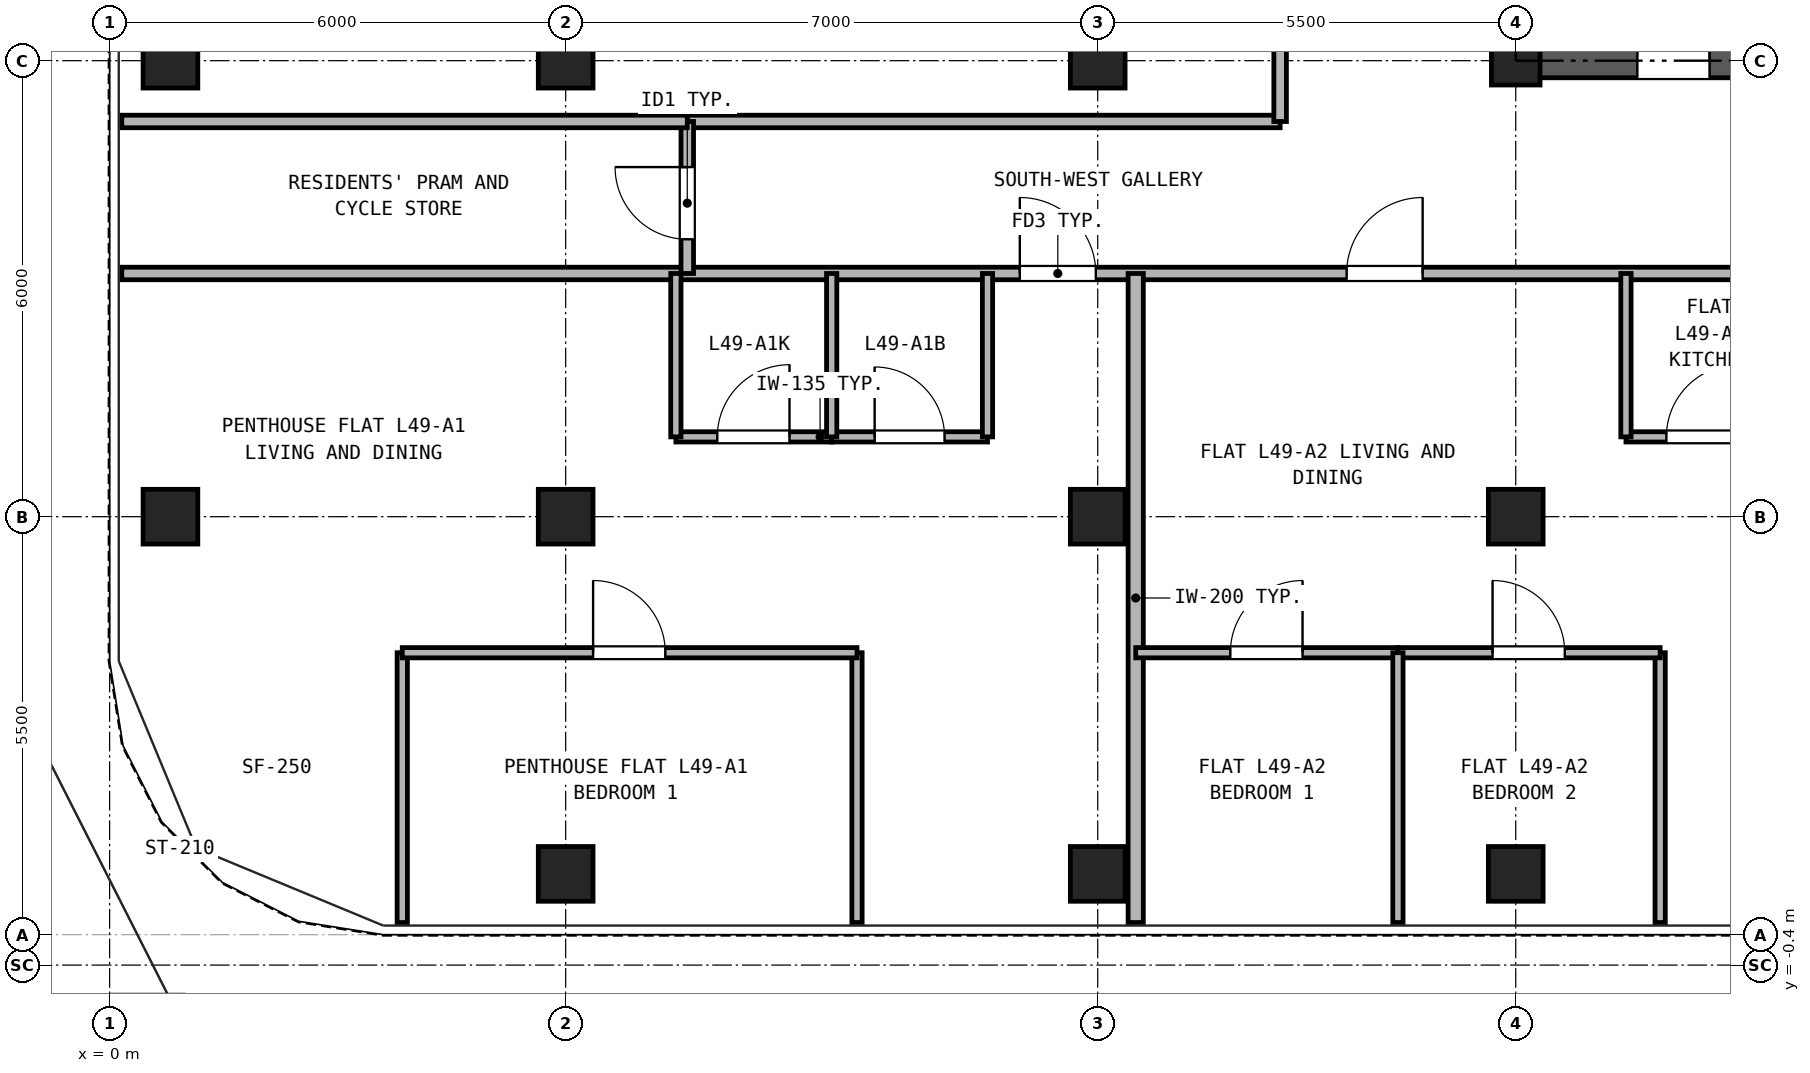
"""IFC4 building model, lengths in metres.
Left out: names, types, materials, properties, quantities, classifications, styles, units other than length and angle.
Written with IfcOpenShell. Run it as: python <this file> out.ifc"""

import sys

from ifc_helpers import new_model, si_unit, direction, frame, frame_2d, origin, origin_2d, place, context, subcontext, project, spatial, rectangle, hollow_rectangle, extrude, source, transform, mapped, element, fill, save


model = new_model("IFC4")
c1 = context("Model", 3, precision=1e-05, world=origin(), true_north=direction((0.0, 1.0)))
c2 = subcontext(c1, "Body", "Model", "MODEL_VIEW")
j1 = project(units=[si_unit("LENGTHUNIT", "METRE"), si_unit("PLANEANGLEUNIT", "RADIAN")], contexts=[c1])
p1 = place(None, origin())
s1 = spatial("IfcSite", under=j1, at=p1, CompositionType="ELEMENT")
p2 = place(p1, origin())
s2 = spatial("IfcBuilding", under=s1, at=p2, CompositionType="ELEMENT")
p3 = place(p2, frame((0.0, 0.0, 175.3)))
s3 = spatial("IfcBuildingStorey", under=s2, at=p3, CompositionType="ELEMENT", Elevation=175.3)
m1 = source(origin(), c2, "Body", "SweptSolid", [
    extrude(hollow_rectangle(XDim=0.72, YDim=0.72, WallThickness=0.04, at=origin_2d()), origin(), (0.0, 0.0, 1.0), 2.95),
])
for number, where, z_axis, x_axis in (
    (1, (6.0, 0.8, 0.0), (0.0, 0.0, 1.0), (1.0, 0.0, 0.0)),
    (2, (13.0, 0.8, 0.0), (0.0, 0.0, 1.0), (1.0, 0.0, 0.0)),
    (3, (18.5, 0.8, 0.0), (0.0, 0.0, 1.0), (1.0, 0.0, 0.0)),
    (4, (0.8, 5.5, 0.0), (0.0, 0.0, 1.0), (1.0, 0.0, 0.0)),
    (5, (0.8, 11.5, 0.0), (0.0, 0.0, 1.0), (1.0, 0.0, 0.0)),
    (6, (6.0, 5.5, 0.0), (0.0, 0.0, 1.0), (1.0, 0.0, 0.0)),
    (7, (6.0, 11.5, 0.0), (0.0, 0.0, 1.0), (1.0, 0.0, 0.0)),
    (8, (13.0, 5.5, 0.0), (0.0, 0.0, 1.0), (1.0, 0.0, 0.0)),
    (9, (13.0, 11.5, 0.0), (0.0, 0.0, 1.0), (1.0, 0.0, 0.0)),
    (10, (18.5, 5.5, 0.0), (0.0, 0.0, 1.0), (1.0, 0.0, 0.0)),
):
    element("IfcColumn", number, at=place(p3, frame(where, z_axis=z_axis, x_axis=x_axis)), inside=s3, PredefinedType="COLUMN", context=c2, shape_type="MappedRepresentation", body=[
        mapped(m1, transform((0.0, 0.0, 0.0), x_axis=(1.0, 0.0, 0.0), y_axis=(0.0, 1.0, 0.0), z_axis=(0.0, 0.0, 1.0), scale=1.0)),
    ])
m2 = source(origin(), c2, "Body", "SweptSolid", [
    extrude(hollow_rectangle(XDim=0.64, YDim=0.64, WallThickness=0.035, at=origin_2d()), origin(), (0.0, 0.0, 1.0), 2.95),
])
p4 = place(p3, frame((18.5, 11.5, 0.0), z_axis=(0.0, 0.0, 1.0), x_axis=(1.0, 0.0, 0.0)))
e11 = element("IfcColumn", 11, at=p4, inside=s3, PredefinedType="COLUMN", context=c2, shape_type="MappedRepresentation", body=[
    mapped(m2, transform((0.0, 0.0, 0.0), x_axis=(1.0, 0.0, 0.0), y_axis=(0.0, 1.0, 0.0), z_axis=(0.0, 0.0, 1.0), scale=1.0)),
])
p5 = place(p3, frame((18.275, 11.5, 0.0), z_axis=(0.0, 0.0, 1.0), x_axis=(1.0, 0.0, 0.0)))
e12 = element("IfcWall", 12, at=p5, inside=s3, PredefinedType="SHEAR", context=c2, shape_type="SweptSolid", body=[
    extrude(rectangle(XDim=10.45, YDim=0.45, at=frame_2d((5.225, 0.0))), origin(), (0.0, 0.0, 1.0), 2.95),
])
p6 = place(p5, frame((1.825, 0.0, 0.0)))
e13 = element("IfcOpeningElement", 13, at=p6, cuts=e12, PredefinedType="OPENING", context=c2, shape_type="SweptSolid", body=[
    extrude(rectangle(XDim=0.95, YDim=2.15, at=frame_2d((0.475, 1.075))), frame((0.0, 0.235, 0.0), z_axis=(0.0, -1.0, 0.0), x_axis=(1.0, 0.0, 0.0)), (0.0, 0.0, 1.0), 0.47),
])
p7 = place(p5, frame((5.325, 0.0, 0.0)))
e14 = element("IfcOpeningElement", 14, at=p7, cuts=e12, PredefinedType="OPENING", context=c2, shape_type="SweptSolid", body=[
    extrude(rectangle(XDim=0.95, YDim=2.15, at=frame_2d((0.475, 1.075))), frame((0.0, 0.235, 0.0), z_axis=(0.0, -1.0, 0.0), x_axis=(1.0, 0.0, 0.0)), (0.0, 0.0, 1.0), 0.47),
])
p8 = place(p5, frame((8.225, 0.0, 0.0)))
e15 = element("IfcOpeningElement", 15, at=p8, cuts=e12, PredefinedType="OPENING", context=c2, shape_type="SweptSolid", body=[
    extrude(rectangle(XDim=1.1, YDim=2.25, at=frame_2d((0.55, 1.125))), frame((0.0, 0.235, 0.0), z_axis=(0.0, -1.0, 0.0), x_axis=(1.0, 0.0, 0.0)), (0.0, 0.0, 1.0), 0.47),
])
p9 = place(p3, frame((0.16, 8.7, 0.0), z_axis=(0.0, 0.0, 1.0), x_axis=(1.0, 0.0, 0.0)))
e16 = element("IfcWall", 16, at=p9, inside=s3, PredefinedType="PARTITIONING", context=c2, shape_type="SweptSolid", body=[
    extrude(rectangle(XDim=41.48, YDim=0.165, at=frame_2d((20.74, 0.0))), origin(), (0.0, 0.0, 1.0), 2.583),
])
p10 = place(p9, frame((11.815, 0.0, 0.0)))
e17 = element("IfcOpeningElement", 17, at=p10, cuts=e16, PredefinedType="OPENING", context=c2, shape_type="SweptSolid", body=[
    extrude(rectangle(XDim=1.0, YDim=2.15, at=frame_2d((0.5, 1.075))), frame((0.0, 0.093, 0.0), z_axis=(0.0, -1.0, 0.0), x_axis=(1.0, 0.0, 0.0)), (0.0, 0.0, 1.0), 0.185),
])
p11 = place(p9, frame((16.115, 0.0, 0.0)))
e18 = element("IfcOpeningElement", 18, at=p11, cuts=e16, PredefinedType="OPENING", context=c2, shape_type="SweptSolid", body=[
    extrude(rectangle(XDim=1.0, YDim=2.15, at=frame_2d((0.5, 1.075))), frame((0.0, 0.093, 0.0), z_axis=(0.0, -1.0, 0.0), x_axis=(1.0, 0.0, 0.0)), (0.0, 0.0, 1.0), 0.185),
])
p12 = place(p9, frame((29.84, 0.0, 0.0)))
e19 = element("IfcOpeningElement", 19, at=p12, cuts=e16, PredefinedType="OPENING", context=c2, shape_type="SweptSolid", body=[
    extrude(rectangle(XDim=1.0, YDim=2.15, at=frame_2d((0.5, 1.075))), frame((0.0, 0.093, 0.0), z_axis=(0.0, -1.0, 0.0), x_axis=(1.0, 0.0, 0.0)), (0.0, 0.0, 1.0), 0.185),
])
p13 = place(p9, frame((33.615, 0.0, 0.0)))
e20 = element("IfcOpeningElement", 20, at=p13, cuts=e16, PredefinedType="OPENING", context=c2, shape_type="SweptSolid", body=[
    extrude(rectangle(XDim=1.0, YDim=2.15, at=frame_2d((0.5, 1.075))), frame((0.0, 0.093, 0.0), z_axis=(0.0, -1.0, 0.0), x_axis=(1.0, 0.0, 0.0)), (0.0, 0.0, 1.0), 0.185),
])
p14 = place(p3, frame((7.6, 10.7, 0.0), z_axis=(0.0, 0.0, 1.0), x_axis=(1.0, 0.0, 0.0)))
e21 = element("IfcWall", 21, at=p14, inside=s3, PredefinedType="PARTITIONING", context=c2, shape_type="SweptSolid", body=[
    extrude(rectangle(XDim=7.8, YDim=0.165, at=frame_2d((3.9, 0.0))), origin(), (0.0, 0.0, 1.0), 2.95),
])
p15 = place(p3, frame((7.6, 8.7, 0.0), z_axis=(0.0, 0.0, 1.0), x_axis=(0.0, 1.0, 0.0)))
e22 = element("IfcWall", 22, at=p15, inside=s3, PredefinedType="PARTITIONING", context=c2, shape_type="SweptSolid", body=[
    extrude(rectangle(XDim=2.0, YDim=0.165, at=frame_2d((1.0, 0.0))), origin(), (0.0, 0.0, 1.0), 2.95),
])
p16 = place(p15, frame((0.45, 0.0, 0.0)))
e23 = element("IfcOpeningElement", 23, at=p16, cuts=e22, PredefinedType="OPENING", context=c2, shape_type="SweptSolid", body=[
    extrude(rectangle(XDim=0.95, YDim=2.15, at=frame_2d((0.475, 1.075))), frame((0.0, 0.093, 0.0), z_axis=(0.0, -1.0, 0.0), x_axis=(1.0, 0.0, 0.0)), (0.0, 0.0, 1.0), 0.185),
])
p17 = place(p3, frame((15.4, 10.7, 0.0), z_axis=(0.0, 0.0, 1.0), x_axis=(0.0, 1.0, 0.0)))
e24 = element("IfcWall", 24, at=p17, inside=s3, PredefinedType="PARTITIONING", context=c2, shape_type="SweptSolid", body=[
    extrude(rectangle(XDim=24.44, YDim=0.165, at=frame_2d((12.22, 0.0))), origin(), (0.0, 0.0, 1.0), 2.95),
])
p18 = place(p17, frame((4.9, 0.0, 0.0)))
e25 = element("IfcOpeningElement", 25, at=p18, cuts=e24, PredefinedType="OPENING", context=c2, shape_type="SweptSolid", body=[
    extrude(rectangle(XDim=0.95, YDim=2.15, at=frame_2d((0.475, 1.075))), frame((0.0, 0.093, 0.0), z_axis=(0.0, -1.0, 0.0), x_axis=(1.0, 0.0, 0.0)), (0.0, 0.0, 1.0), 0.185),
])
p19 = place(p17, frame((13.8, 0.0, 0.0)))
e26 = element("IfcOpeningElement", 26, at=p19, cuts=e24, PredefinedType="OPENING", context=c2, shape_type="SweptSolid", body=[
    extrude(rectangle(XDim=0.95, YDim=2.15, at=frame_2d((0.475, 1.075))), frame((0.0, 0.093, 0.0), z_axis=(0.0, -1.0, 0.0), x_axis=(1.0, 0.0, 0.0)), (0.0, 0.0, 1.0), 0.185),
])
p20 = place(p17, frame((18.7, 0.0, 0.0)))
e27 = element("IfcOpeningElement", 27, at=p20, cuts=e24, PredefinedType="OPENING", context=c2, shape_type="SweptSolid", body=[
    extrude(rectangle(XDim=0.95, YDim=2.15, at=frame_2d((0.475, 1.075))), frame((0.0, 0.093, 0.0), z_axis=(0.0, -1.0, 0.0), x_axis=(1.0, 0.0, 0.0)), (0.0, 0.0, 1.0), 0.185),
])
p21 = place(p3, frame((7.45, 6.55, 0.0), z_axis=(0.0, 0.0, 1.0), x_axis=(1.0, 0.0, 0.0)))
e28 = element("IfcWall", 28, at=p21, inside=s3, PredefinedType="PARTITIONING", context=c2, shape_type="SweptSolid", body=[
    extrude(rectangle(XDim=2.05, YDim=0.135, at=frame_2d((1.025, 0.0))), origin(), (0.0, 0.0, 1.0), 2.95),
])
p22 = place(p21, frame((0.545, 0.0, 0.0)))
e29 = element("IfcOpeningElement", 29, at=p22, cuts=e28, PredefinedType="OPENING", context=c2, shape_type="SweptSolid", body=[
    extrude(rectangle(XDim=0.95, YDim=2.15, at=frame_2d((0.475, 1.075))), frame((0.0, 0.077, 0.0), z_axis=(0.0, -1.0, 0.0), x_axis=(1.0, 0.0, 0.0)), (0.0, 0.0, 1.0), 0.155),
])
p23 = place(p3, frame((9.5, 6.55, 0.0), z_axis=(0.0, 0.0, 1.0), x_axis=(1.0, 0.0, 0.0)))
e30 = element("IfcWall", 30, at=p23, inside=s3, PredefinedType="PARTITIONING", context=c2, shape_type="SweptSolid", body=[
    extrude(rectangle(XDim=2.05, YDim=0.135, at=frame_2d((1.025, 0.0))), origin(), (0.0, 0.0, 1.0), 2.95),
])
p24 = place(p23, frame((0.565, 0.0, 0.0)))
e31 = element("IfcOpeningElement", 31, at=p24, cuts=e30, PredefinedType="OPENING", context=c2, shape_type="SweptSolid", body=[
    extrude(rectangle(XDim=0.92, YDim=2.1, at=frame_2d((0.46, 1.05))), frame((0.0, 0.077, 0.0), z_axis=(0.0, -1.0, 0.0), x_axis=(1.0, 0.0, 0.0)), (0.0, 0.0, 1.0), 0.155),
])
for number, where, z_axis, x_axis in (
    (32, (7.45, 6.55, 0.0), (0.0, 0.0, 1.0), (0.0, 1.0, 0.0)),
    (33, (9.5, 6.55, 0.0), (0.0, 0.0, 1.0), (0.0, 1.0, 0.0)),
    (34, (11.55, 6.55, 0.0), (0.0, 0.0, 1.0), (0.0, 1.0, 0.0)),
):
    element("IfcWall", number, at=place(p3, frame(where, z_axis=z_axis, x_axis=x_axis)), inside=s3, PredefinedType="PARTITIONING", context=c2, shape_type="SweptSolid", body=[
        extrude(rectangle(XDim=2.15, YDim=0.135, at=frame_2d((1.075, 0.0))), origin(), (0.0, 0.0, 1.0), 2.95),
    ])
for number, where, z_axis, x_axis in (
    (35, (3.85, 0.16, 0.0), (0.0, 0.0, 1.0), (0.0, 1.0, 0.0)),
    (36, (9.833, 0.16, 0.0), (0.0, 0.0, 1.0), (0.0, 1.0, 0.0)),
):
    element("IfcWall", number, at=place(p3, frame(where, z_axis=z_axis, x_axis=x_axis)), inside=s3, PredefinedType="PARTITIONING", context=c2, shape_type="SweptSolid", body=[
        extrude(rectangle(XDim=3.55, YDim=0.135, at=frame_2d((1.775, 0.0))), origin(), (0.0, 0.0, 1.0), 2.95),
    ])
p25 = place(p3, frame((3.85, 3.71, 0.0), z_axis=(0.0, 0.0, 1.0), x_axis=(1.0, 0.0, 0.0)))
e37 = element("IfcWall", 37, at=p25, inside=s3, PredefinedType="PARTITIONING", context=c2, shape_type="SweptSolid", body=[
    extrude(rectangle(XDim=5.983, YDim=0.135, at=frame_2d((2.991, 0.0))), origin(), (0.0, 0.0, 1.0), 2.95),
])
p26 = place(p25, frame((2.511, 0.0, 0.0)))
e38 = element("IfcOpeningElement", 38, at=p26, cuts=e37, PredefinedType="OPENING", context=c2, shape_type="SweptSolid", body=[
    extrude(rectangle(XDim=0.95, YDim=2.15, at=frame_2d((0.475, 1.075))), frame((0.0, 0.077, 0.0), z_axis=(0.0, -1.0, 0.0), x_axis=(1.0, 0.0, 0.0)), (0.0, 0.0, 1.0), 0.155),
])
p27 = place(p3, frame((13.5, 0.16, 0.0), z_axis=(0.0, 0.0, 1.0), x_axis=(0.0, 1.0, 0.0)))
e39 = element("IfcWall", 39, at=p27, inside=s3, PredefinedType="PARTITIONING", context=c2, shape_type="SweptSolid", body=[
    extrude(rectangle(XDim=8.54, YDim=0.2, at=frame_2d((4.27, 0.0))), origin(), (0.0, 0.0, 1.0), 2.95),
])
p28 = place(p3, frame((19.95, 6.55, 0.0), z_axis=(0.0, 0.0, 1.0), x_axis=(1.0, 0.0, 0.0)))
e40 = element("IfcWall", 40, at=p28, inside=s3, PredefinedType="PARTITIONING", context=c2, shape_type="SweptSolid", body=[
    extrude(rectangle(XDim=2.025, YDim=0.135, at=frame_2d((1.013, 0.0))), origin(), (0.0, 0.0, 1.0), 2.95),
])
p29 = place(p28, frame((0.532, 0.0, 0.0)))
e41 = element("IfcOpeningElement", 41, at=p29, cuts=e40, PredefinedType="OPENING", context=c2, shape_type="SweptSolid", body=[
    extrude(rectangle(XDim=0.95, YDim=2.15, at=frame_2d((0.475, 1.075))), frame((0.0, 0.077, 0.0), z_axis=(0.0, -1.0, 0.0), x_axis=(1.0, 0.0, 0.0)), (0.0, 0.0, 1.0), 0.155),
])
p30 = place(p3, frame((19.95, 6.55, 0.0), z_axis=(0.0, 0.0, 1.0), x_axis=(0.0, 1.0, 0.0)))
e42 = element("IfcWall", 42, at=p30, inside=s3, PredefinedType="PARTITIONING", context=c2, shape_type="SweptSolid", body=[
    extrude(rectangle(XDim=2.15, YDim=0.135, at=frame_2d((1.075, 0.0))), origin(), (0.0, 0.0, 1.0), 2.95),
])
p31 = place(p3, frame((20.4, 0.16, 0.0), z_axis=(0.0, 0.0, 1.0), x_axis=(0.0, 1.0, 0.0)))
e43 = element("IfcWall", 43, at=p31, inside=s3, PredefinedType="PARTITIONING", context=c2, shape_type="SweptSolid", body=[
    extrude(rectangle(XDim=3.55, YDim=0.135, at=frame_2d((1.775, 0.0))), origin(), (0.0, 0.0, 1.0), 2.95),
])
p32 = place(p3, frame((13.5, 3.71, 0.0), z_axis=(0.0, 0.0, 1.0), x_axis=(1.0, 0.0, 0.0)))
e44 = element("IfcWall", 44, at=p32, inside=s3, PredefinedType="PARTITIONING", context=c2, shape_type="SweptSolid", body=[
    extrude(rectangle(XDim=3.45, YDim=0.135, at=frame_2d((1.725, 0.0))), origin(), (0.0, 0.0, 1.0), 2.95),
])
p33 = place(p32, frame((1.245, 0.0, 0.0)))
e45 = element("IfcOpeningElement", 45, at=p33, cuts=e44, PredefinedType="OPENING", context=c2, shape_type="SweptSolid", body=[
    extrude(rectangle(XDim=0.95, YDim=2.15, at=frame_2d((0.475, 1.075))), frame((0.0, 0.077, 0.0), z_axis=(0.0, -1.0, 0.0), x_axis=(1.0, 0.0, 0.0)), (0.0, 0.0, 1.0), 0.155),
])
p34 = place(p3, frame((16.95, 3.71, 0.0), z_axis=(0.0, 0.0, 1.0), x_axis=(1.0, 0.0, 0.0)))
e46 = element("IfcWall", 46, at=p34, inside=s3, PredefinedType="PARTITIONING", context=c2, shape_type="SweptSolid", body=[
    extrude(rectangle(XDim=3.45, YDim=0.135, at=frame_2d((1.725, 0.0))), origin(), (0.0, 0.0, 1.0), 2.95),
])
p35 = place(p34, frame((1.245, 0.0, 0.0)))
e47 = element("IfcOpeningElement", 47, at=p35, cuts=e46, PredefinedType="OPENING", context=c2, shape_type="SweptSolid", body=[
    extrude(rectangle(XDim=0.95, YDim=2.15, at=frame_2d((0.475, 1.075))), frame((0.0, 0.077, 0.0), z_axis=(0.0, -1.0, 0.0), x_axis=(1.0, 0.0, 0.0)), (0.0, 0.0, 1.0), 0.155),
])
p36 = place(p3, frame((16.95, 0.16, 0.0), z_axis=(0.0, 0.0, 1.0), x_axis=(0.0, 1.0, 0.0)))
e48 = element("IfcWall", 48, at=p36, inside=s3, PredefinedType="PARTITIONING", context=c2, shape_type="SweptSolid", body=[
    extrude(rectangle(XDim=3.55, YDim=0.135, at=frame_2d((1.775, 0.0))), origin(), (0.0, 0.0, 1.0), 2.95),
])
p37 = place(p3, frame((0.16, 10.7, 0.0), z_axis=(0.0, 0.0, 1.0), x_axis=(1.0, 0.0, 0.0)))
e49 = element("IfcWall", 49, at=p37, inside=s3, PredefinedType="PARTITIONING", context=c2, shape_type="SweptSolid", body=[
    extrude(rectangle(XDim=7.44, YDim=0.165, at=frame_2d((3.72, 0.0))), origin(), (0.0, 0.0, 1.0), 2.95),
])
p38 = place(p6, frame((0.95, 0.0, 0.0), z_axis=(0.0, 0.0, 1.0), x_axis=(-1.0, 0.0, 0.0)))
e50 = element("IfcDoor", 50, at=p38, inside=s3, OperationType="SINGLE_SWING_RIGHT", PredefinedType="DOOR", context=c2, shape_type="SweptSolid", body=[
    extrude(rectangle(XDim=0.95, YDim=2.15, at=frame_2d((0.475, 1.075))), frame((0.0, 0.025, 0.0), z_axis=(0.0, -1.0, 0.0), x_axis=(1.0, 0.0, 0.0)), (0.0, 0.0, 1.0), 0.05),
])
fill(e13, e50)
p39 = place(p22, origin())
e51 = element("IfcDoor", 51, at=p39, inside=s3, OperationType="SINGLE_SWING_RIGHT", PredefinedType="DOOR", context=c2, shape_type="SweptSolid", body=[
    extrude(rectangle(XDim=0.95, YDim=2.15, at=frame_2d((0.475, 1.075))), frame((0.0, 0.025, 0.0), z_axis=(0.0, -1.0, 0.0), x_axis=(1.0, 0.0, 0.0)), (0.0, 0.0, 1.0), 0.05),
])
fill(e29, e51)
p40 = place(p24, origin())
e52 = element("IfcDoor", 52, at=p40, inside=s3, OperationType="SINGLE_SWING_LEFT", PredefinedType="DOOR", context=c2, shape_type="SweptSolid", body=[
    extrude(rectangle(XDim=0.92, YDim=2.1, at=frame_2d((0.46, 1.05))), frame((0.0, 0.025, 0.0), z_axis=(0.0, -1.0, 0.0), x_axis=(1.0, 0.0, 0.0)), (0.0, 0.0, 1.0), 0.05),
])
fill(e31, e52)
p41 = place(p26, frame((0.95, 0.0, 0.0), z_axis=(0.0, 0.0, 1.0), x_axis=(-1.0, 0.0, 0.0)))
e53 = element("IfcDoor", 53, at=p41, inside=s3, OperationType="SINGLE_SWING_LEFT", PredefinedType="DOOR", context=c2, shape_type="SweptSolid", body=[
    extrude(rectangle(XDim=0.95, YDim=2.15, at=frame_2d((0.475, 1.075))), frame((0.0, 0.025, 0.0), z_axis=(0.0, -1.0, 0.0), x_axis=(1.0, 0.0, 0.0)), (0.0, 0.0, 1.0), 0.05),
])
fill(e38, e53)
p42 = place(p10, frame((1.0, 0.0, 0.0), z_axis=(0.0, 0.0, 1.0), x_axis=(-1.0, 0.0, 0.0)))
e54 = element("IfcDoor", 54, at=p42, inside=s3, OperationType="SINGLE_SWING_LEFT", PredefinedType="DOOR", context=c2, shape_type="SweptSolid", body=[
    extrude(rectangle(XDim=1.0, YDim=2.15, at=frame_2d((0.5, 1.075))), frame((0.0, 0.025, 0.0), z_axis=(0.0, -1.0, 0.0), x_axis=(1.0, 0.0, 0.0)), (0.0, 0.0, 1.0), 0.05),
])
fill(e17, e54)
p43 = place(p29, origin())
e55 = element("IfcDoor", 55, at=p43, inside=s3, OperationType="SINGLE_SWING_RIGHT", PredefinedType="DOOR", context=c2, shape_type="SweptSolid", body=[
    extrude(rectangle(XDim=0.95, YDim=2.15, at=frame_2d((0.475, 1.075))), frame((0.0, 0.025, 0.0), z_axis=(0.0, -1.0, 0.0), x_axis=(1.0, 0.0, 0.0)), (0.0, 0.0, 1.0), 0.05),
])
fill(e41, e55)
p44 = place(p33, frame((0.95, 0.0, 0.0), z_axis=(0.0, 0.0, 1.0), x_axis=(-1.0, 0.0, 0.0)))
e56 = element("IfcDoor", 56, at=p44, inside=s3, OperationType="SINGLE_SWING_RIGHT", PredefinedType="DOOR", context=c2, shape_type="SweptSolid", body=[
    extrude(rectangle(XDim=0.95, YDim=2.15, at=frame_2d((0.475, 1.075))), frame((0.0, 0.025, 0.0), z_axis=(0.0, -1.0, 0.0), x_axis=(1.0, 0.0, 0.0)), (0.0, 0.0, 1.0), 0.05),
])
fill(e45, e56)
p45 = place(p35, frame((0.95, 0.0, 0.0), z_axis=(0.0, 0.0, 1.0), x_axis=(-1.0, 0.0, 0.0)))
e57 = element("IfcDoor", 57, at=p45, inside=s3, OperationType="SINGLE_SWING_LEFT", PredefinedType="DOOR", context=c2, shape_type="SweptSolid", body=[
    extrude(rectangle(XDim=0.95, YDim=2.15, at=frame_2d((0.475, 1.075))), frame((0.0, 0.025, 0.0), z_axis=(0.0, -1.0, 0.0), x_axis=(1.0, 0.0, 0.0)), (0.0, 0.0, 1.0), 0.05),
])
fill(e47, e57)
p46 = place(p11, frame((1.0, 0.0, 0.0), z_axis=(0.0, 0.0, 1.0), x_axis=(-1.0, 0.0, 0.0)))
e58 = element("IfcDoor", 58, at=p46, inside=s3, OperationType="SINGLE_SWING_RIGHT", PredefinedType="DOOR", context=c2, shape_type="SweptSolid", body=[
    extrude(rectangle(XDim=1.0, YDim=2.15, at=frame_2d((0.5, 1.075))), frame((0.0, 0.025, 0.0), z_axis=(0.0, -1.0, 0.0), x_axis=(1.0, 0.0, 0.0)), (0.0, 0.0, 1.0), 0.05),
])
fill(e18, e58)
p47 = place(p16, frame((0.95, 0.0, 0.0), z_axis=(0.0, 0.0, 1.0), x_axis=(-1.0, 0.0, 0.0)))
e59 = element("IfcDoor", 59, at=p47, inside=s3, OperationType="SINGLE_SWING_RIGHT", PredefinedType="DOOR", context=c2, shape_type="SweptSolid", body=[
    extrude(rectangle(XDim=0.95, YDim=2.15, at=frame_2d((0.475, 1.075))), frame((0.0, 0.025, 0.0), z_axis=(0.0, -1.0, 0.0), x_axis=(1.0, 0.0, 0.0)), (0.0, 0.0, 1.0), 0.05),
])
fill(e23, e59)
save(model, sys.argv[1])
